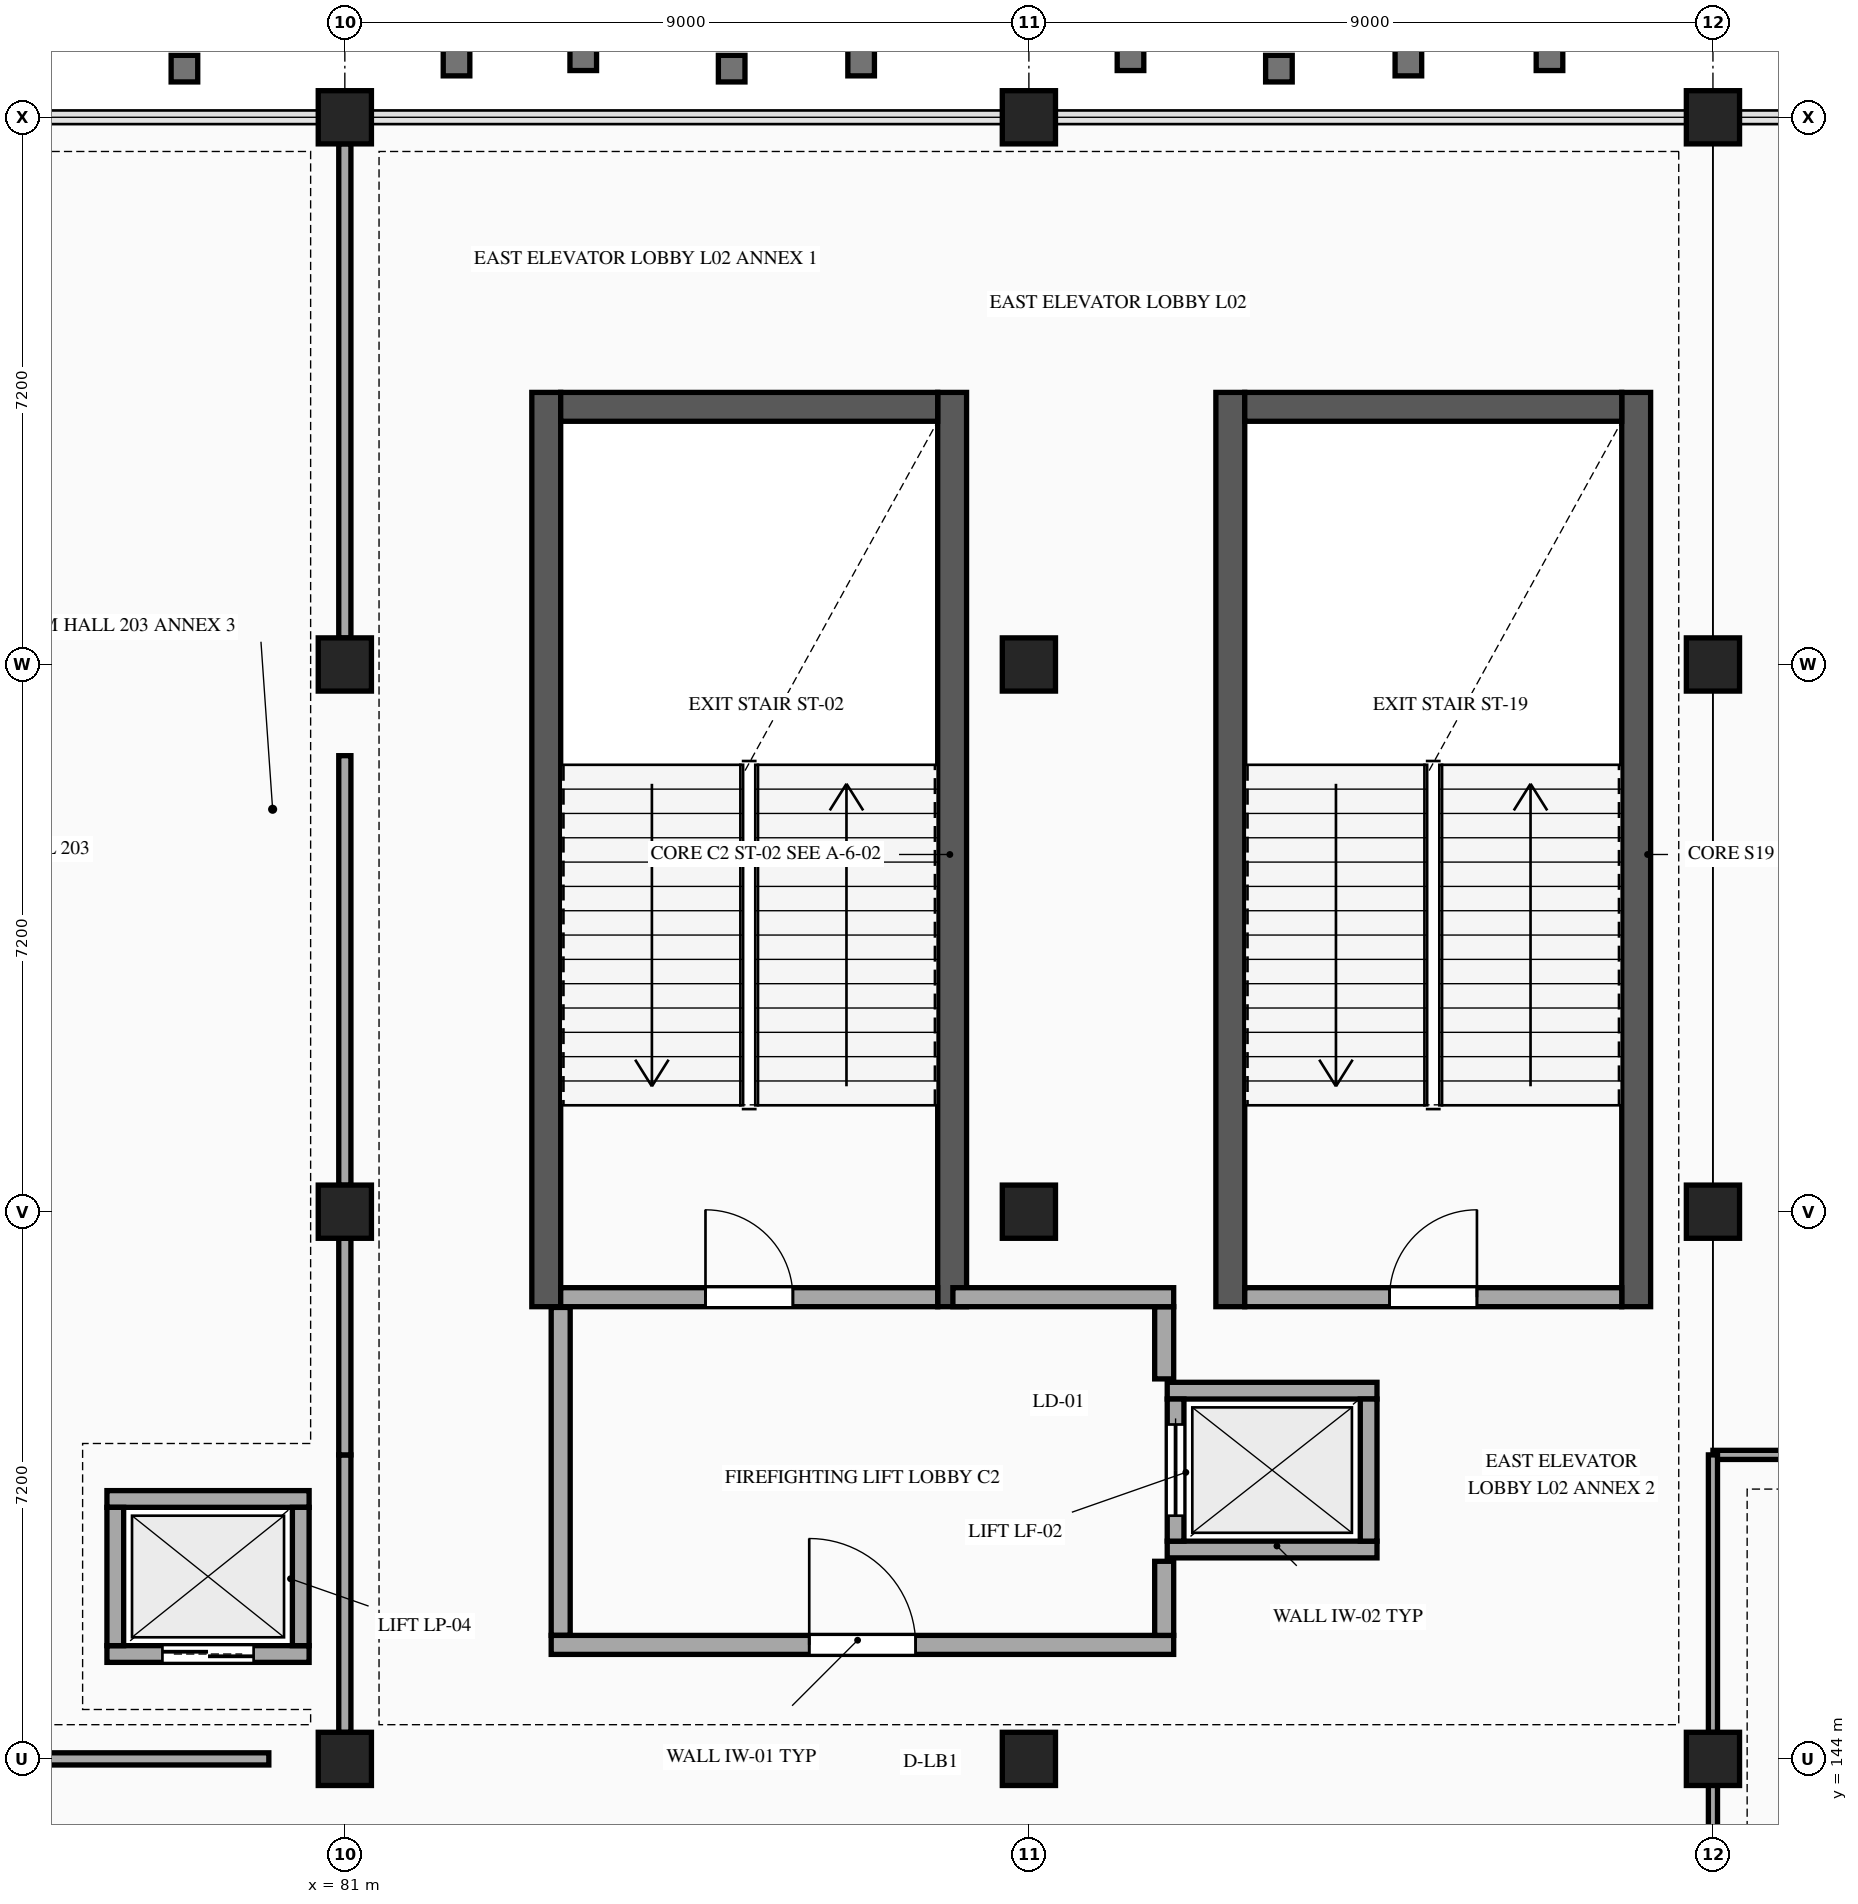
"""IFC4 building model, lengths in metres.
Left out: names, types, materials, properties, quantities, classifications, styles, units other than length and angle.
Written with IfcOpenShell. Run it as: python <this file> out.ifc"""

import sys

from ifc_helpers import new_model, si_unit, direction, frame, frame_2d, origin, origin_2d, place, context, subcontext, project, spatial, rectangle, extrude, element, fill, save


model = new_model("IFC4")
c1 = context("Model", 3, precision=1e-05, world=origin(), true_north=direction((0.0, 1.0)))
c2 = subcontext(c1, "Body", "Model", "MODEL_VIEW")
j1 = project(units=[si_unit("LENGTHUNIT", "METRE"), si_unit("PLANEANGLEUNIT", "RADIAN")], contexts=[c1])
p1 = place(None, origin())
s1 = spatial("IfcSite", under=j1, at=p1, CompositionType="ELEMENT")
p2 = place(p1, origin())
s2 = spatial("IfcBuilding", under=s1, at=p2, CompositionType="ELEMENT")
p3 = place(p2, frame((0.0, 0.0, 10.8)))
s3 = spatial("IfcBuildingStorey", under=s2, at=p3, CompositionType="ELEMENT", Elevation=10.8)
for number, where, z_axis, x_axis in (
    (1, (81.0, 144.0, 0.0), (0.0, 0.0, 1.0), (1.0, 0.0, 0.0)),
    (2, (81.0, 151.2, 0.0), (0.0, 0.0, 1.0), (1.0, 0.0, 0.0)),
    (3, (81.0, 158.4, 0.0), (0.0, 0.0, 1.0), (1.0, 0.0, 0.0)),
    (4, (81.0, 165.6, 0.0), (0.0, 0.0, 1.0), (1.0, 0.0, 0.0)),
    (5, (90.0, 144.0, 0.0), (0.0, 0.0, 1.0), (1.0, 0.0, 0.0)),
    (6, (90.0, 151.2, 0.0), (0.0, 0.0, 1.0), (1.0, 0.0, 0.0)),
    (7, (90.0, 158.4, 0.0), (0.0, 0.0, 1.0), (1.0, 0.0, 0.0)),
    (8, (90.0, 165.6, 0.0), (0.0, 0.0, 1.0), (1.0, 0.0, 0.0)),
    (9, (99.0, 144.0, 0.0), (0.0, 0.0, 1.0), (1.0, 0.0, 0.0)),
    (10, (99.0, 151.2, 0.0), (0.0, 0.0, 1.0), (1.0, 0.0, 0.0)),
    (11, (99.0, 158.4, 0.0), (0.0, 0.0, 1.0), (1.0, 0.0, 0.0)),
    (12, (99.0, 165.6, 0.0), (0.0, 0.0, 1.0), (1.0, 0.0, 0.0)),
):
    element("IfcColumn", number, at=place(p3, frame(where, z_axis=z_axis, x_axis=x_axis)), inside=s3, PredefinedType="COLUMN", context=c2, shape_type="SweptSolid", body=[
        extrude(rectangle(XDim=0.7, YDim=0.7, at=origin_2d()), origin(), (0.0, 0.0, 1.0), 4.5),
    ])
for number, where, z_axis, x_axis in (
    (13, (83.65, 149.95, 0.0), (0.0, 0.0, 1.0), (0.0, 1.0, 0.0)),
    (14, (88.99, 161.98, 0.0), (0.0, 0.0, 1.0), (0.0, -1.0, 0.0)),
):
    element("IfcWall", number, at=place(p3, frame(where, z_axis=z_axis, x_axis=x_axis)), inside=s3, PredefinedType="SHEAR", context=c2, shape_type="SweptSolid", body=[
        extrude(rectangle(XDim=12.03, YDim=0.38, at=frame_2d((6.015, 0.0))), origin(), (0.0, 0.0, 1.0), 4.25),
    ])
p4 = place(p3, frame((83.84, 161.79, 0.0), z_axis=(0.0, 0.0, 1.0), x_axis=(1.0, 0.0, 0.0)))
e15 = element("IfcWall", 15, at=p4, inside=s3, PredefinedType="SHEAR", context=c2, shape_type="SweptSolid", body=[
    extrude(rectangle(XDim=4.96, YDim=0.38, at=frame_2d((2.48, 0.0))), origin(), (0.0, 0.0, 1.0), 4.25),
])
for number, where, z_axis, x_axis in (
    (16, (92.65, 149.95, 0.0), (0.0, 0.0, 1.0), (0.0, 1.0, 0.0)),
    (17, (97.99, 161.98, 0.0), (0.0, 0.0, 1.0), (0.0, -1.0, 0.0)),
):
    element("IfcWall", number, at=place(p3, frame(where, z_axis=z_axis, x_axis=x_axis)), inside=s3, PredefinedType="SHEAR", context=c2, shape_type="SweptSolid", body=[
        extrude(rectangle(XDim=12.03, YDim=0.38, at=frame_2d((6.015, 0.0))), origin(), (0.0, 0.0, 1.0), 4.25),
    ])
p5 = place(p3, frame((92.84, 161.79, 0.0), z_axis=(0.0, 0.0, 1.0), x_axis=(1.0, 0.0, 0.0)))
e18 = element("IfcWall", 18, at=p5, inside=s3, PredefinedType="SHEAR", context=c2, shape_type="SweptSolid", body=[
    extrude(rectangle(XDim=4.96, YDim=0.38, at=frame_2d((2.48, 0.0))), origin(), (0.0, 0.0, 1.0), 4.25),
])
p6 = place(p3, frame((83.84, 150.075, 0.0), z_axis=(0.0, 0.0, 1.0), x_axis=(1.0, 0.0, 0.0)))
e19 = element("IfcWall", 19, at=p6, inside=s3, PredefinedType="STANDARD", context=c2, shape_type="SweptSolid", body=[
    extrude(rectangle(XDim=4.96, YDim=0.25, at=frame_2d((2.48, 0.0))), origin(), (0.0, 0.0, 1.0), 4.22),
])
p7 = place(p6, frame((1.905, 0.0, 0.0)))
e20 = element("IfcOpeningElement", 20, at=p7, cuts=e19, PredefinedType="OPENING", context=c2, shape_type="SweptSolid", body=[
    extrude(rectangle(XDim=1.15, YDim=2.2, at=frame_2d((0.575, 1.1))), frame((0.0, 0.135, 0.0), z_axis=(0.0, -1.0, 0.0), x_axis=(1.0, 0.0, 0.0)), (0.0, 0.0, 1.0), 0.27),
])
for number, where, z_axis, x_axis in (
    (21, (91.82, 146.755, 0.0), (0.0, 0.0, 1.0), (1.0, 0.0, 0.0)),
    (22, (94.58, 148.845, 0.0), (0.0, 0.0, 1.0), (-1.0, 0.0, 0.0)),
):
    element("IfcWall", number, at=place(p3, frame(where, z_axis=z_axis, x_axis=x_axis)), inside=s3, PredefinedType="STANDARD", context=c2, shape_type="SweptSolid", body=[
        extrude(rectangle(XDim=2.76, YDim=0.22, at=frame_2d((1.38, 0.0))), origin(), (0.0, 0.0, 1.0), 4.22),
    ])
p8 = place(p3, frame((91.93, 148.735, 0.0), z_axis=(0.0, 0.0, 1.0), x_axis=(0.0, -1.0, 0.0)))
e23 = element("IfcWall", 23, at=p8, inside=s3, PredefinedType="STANDARD", context=c2, shape_type="SweptSolid", body=[
    extrude(rectangle(XDim=1.87, YDim=0.22, at=frame_2d((0.935, 0.0))), origin(), (0.0, 0.0, 1.0), 4.22),
])
p9 = place(p8, frame((0.335, 0.0, 0.0)))
e24 = element("IfcOpeningElement", 24, at=p9, cuts=e23, PredefinedType="OPENING", context=c2, shape_type="SweptSolid", body=[
    extrude(rectangle(XDim=1.2, YDim=2.2, at=frame_2d((0.6, 1.1))), frame((0.0, 0.12, 0.0), z_axis=(0.0, -1.0, 0.0), x_axis=(1.0, 0.0, 0.0)), (0.0, 0.0, 1.0), 0.24),
])
p10 = place(p3, frame((94.47, 146.865, 0.0), z_axis=(0.0, 0.0, 1.0), x_axis=(0.0, 1.0, 0.0)))
e25 = element("IfcWall", 25, at=p10, inside=s3, PredefinedType="STANDARD", context=c2, shape_type="SweptSolid", body=[
    extrude(rectangle(XDim=1.87, YDim=0.22, at=frame_2d((0.935, 0.0))), origin(), (0.0, 0.0, 1.0), 4.22),
])
p11 = place(p3, frame((77.87, 145.38, 0.0), z_axis=(0.0, 0.0, 1.0), x_axis=(1.0, 0.0, 0.0)))
e26 = element("IfcWall", 26, at=p11, inside=s3, PredefinedType="STANDARD", context=c2, shape_type="SweptSolid", body=[
    extrude(rectangle(XDim=2.66, YDim=0.22, at=frame_2d((1.33, 0.0))), origin(), (0.0, 0.0, 1.0), 4.22),
])
p12 = place(p11, frame((0.73, 0.0, 0.0)))
e27 = element("IfcOpeningElement", 27, at=p12, cuts=e26, PredefinedType="OPENING", context=c2, shape_type="SweptSolid", body=[
    extrude(rectangle(XDim=1.2, YDim=2.2, at=frame_2d((0.6, 1.1))), frame((0.0, 0.12, 0.0), z_axis=(0.0, -1.0, 0.0), x_axis=(1.0, 0.0, 0.0)), (0.0, 0.0, 1.0), 0.24),
])
p13 = place(p3, frame((80.53, 147.42, 0.0), z_axis=(0.0, 0.0, 1.0), x_axis=(-1.0, 0.0, 0.0)))
e28 = element("IfcWall", 28, at=p13, inside=s3, PredefinedType="STANDARD", context=c2, shape_type="SweptSolid", body=[
    extrude(rectangle(XDim=2.66, YDim=0.22, at=frame_2d((1.33, 0.0))), origin(), (0.0, 0.0, 1.0), 4.22),
])
for number, where, z_axis, x_axis in (
    (29, (77.98, 147.31, 0.0), (0.0, 0.0, 1.0), (0.0, -1.0, 0.0)),
    (30, (80.42, 145.49, 0.0), (0.0, 0.0, 1.0), (0.0, 1.0, 0.0)),
):
    element("IfcWall", number, at=place(p3, frame(where, z_axis=z_axis, x_axis=x_axis)), inside=s3, PredefinedType="STANDARD", context=c2, shape_type="SweptSolid", body=[
        extrude(rectangle(XDim=1.82, YDim=0.22, at=frame_2d((0.91, 0.0))), origin(), (0.0, 0.0, 1.0), 4.22),
    ])
p14 = place(p3, frame((92.84, 150.075, 0.0), z_axis=(0.0, 0.0, 1.0), x_axis=(1.0, 0.0, 0.0)))
e31 = element("IfcWall", 31, at=p14, inside=s3, PredefinedType="STANDARD", context=c2, shape_type="SweptSolid", body=[
    extrude(rectangle(XDim=4.96, YDim=0.25, at=frame_2d((2.48, 0.0))), origin(), (0.0, 0.0, 1.0), 4.22),
])
p15 = place(p14, frame((1.905, 0.0, 0.0)))
e32 = element("IfcOpeningElement", 32, at=p15, cuts=e31, PredefinedType="OPENING", context=c2, shape_type="SweptSolid", body=[
    extrude(rectangle(XDim=1.15, YDim=2.2, at=frame_2d((0.575, 1.1))), frame((0.0, 0.135, 0.0), z_axis=(0.0, -1.0, 0.0), x_axis=(1.0, 0.0, 0.0)), (0.0, 0.0, 1.0), 0.27),
])
p16 = place(p3, frame((83.84, 149.94, 0.0), z_axis=(0.0, 0.0, 1.0), x_axis=(0.0, -1.0, 0.0)))
e33 = element("IfcWall", 33, at=p16, inside=s3, PredefinedType="STANDARD", context=c2, shape_type="SweptSolid", body=[
    extrude(rectangle(XDim=4.315, YDim=0.25, at=frame_2d((2.157, 0.0))), origin(), (0.0, 0.0, 1.0), 3.638),
])
p17 = place(p3, frame((83.715, 145.5, 0.0), z_axis=(0.0, 0.0, 1.0), x_axis=(1.0, 0.0, 0.0)))
e34 = element("IfcWall", 34, at=p17, inside=s3, PredefinedType="STANDARD", context=c2, shape_type="SweptSolid", body=[
    extrude(rectangle(XDim=8.19, YDim=0.25, at=frame_2d((4.095, 0.0))), origin(), (0.0, 0.0, 1.0), 3.638),
])
p18 = place(p17, frame((3.395, 0.0, 0.0)))
e35 = element("IfcOpeningElement", 35, at=p18, cuts=e34, PredefinedType="OPENING", context=c2, shape_type="SweptSolid", body=[
    extrude(rectangle(XDim=1.4, YDim=2.2, at=frame_2d((0.7, 1.1))), frame((0.0, 0.135, 0.0), z_axis=(0.0, -1.0, 0.0), x_axis=(1.0, 0.0, 0.0)), (0.0, 0.0, 1.0), 0.27),
])
p19 = place(p3, frame((91.78, 145.625, 0.0), z_axis=(0.0, 0.0, 1.0), x_axis=(0.0, 1.0, 0.0)))
e36 = element("IfcWall", 36, at=p19, inside=s3, PredefinedType="STANDARD", context=c2, shape_type="SweptSolid", body=[
    extrude(rectangle(XDim=0.975, YDim=0.25, at=frame_2d((0.488, 0.0))), origin(), (0.0, 0.0, 1.0), 3.638),
])
p20 = place(p3, frame((91.78, 149.0, 0.0), z_axis=(0.0, 0.0, 1.0), x_axis=(0.0, 1.0, 0.0)))
e37 = element("IfcWall", 37, at=p20, inside=s3, PredefinedType="STANDARD", context=c2, shape_type="SweptSolid", body=[
    extrude(rectangle(XDim=0.95, YDim=0.25, at=frame_2d((0.475, 0.0))), origin(), (0.0, 0.0, 1.0), 3.638),
])
p21 = place(p3, frame((89.0, 150.075, 0.0), z_axis=(0.0, 0.0, 1.0), x_axis=(1.0, 0.0, 0.0)))
e38 = element("IfcWall", 38, at=p21, inside=s3, PredefinedType="STANDARD", context=c2, shape_type="SweptSolid", body=[
    extrude(rectangle(XDim=2.905, YDim=0.25, at=frame_2d((1.453, 0.0))), origin(), (0.0, 0.0, 1.0), 3.638),
])
p22 = place(p3, frame((76.5, 144.0, 0.0), z_axis=(0.0, 0.0, 1.0), x_axis=(1.0, 0.0, 0.0)))
e39 = element("IfcWall", 39, at=p22, inside=s3, PredefinedType="PARTITIONING", context=c2, shape_type="SweptSolid", body=[
    extrude(rectangle(XDim=3.5, YDim=0.16, at=frame_2d((1.75, 0.0))), origin(), (0.0, 0.0, 1.0), 3.628),
])
p23 = place(p3, frame((99.0, 148.0, 0.0), z_axis=(0.0, 0.0, 1.0), x_axis=(1.0, 0.0, 0.0)))
e40 = element("IfcWall", 40, at=p23, inside=s3, PredefinedType="PARTITIONING", context=c2, shape_type="SweptSolid", body=[
    extrude(rectangle(XDim=9.0, YDim=0.12, at=frame_2d((4.5, 0.0))), origin(), (0.0, 0.0, 1.0), 3.638),
])
p24 = place(p3, frame((81.0, 144.348, 0.0), z_axis=(0.0, 0.0, 1.0), x_axis=(0.0, 1.0, 0.0)))
e41 = element("IfcWall", 41, at=p24, inside=s3, PredefinedType="PARTITIONING", context=c2, shape_type="SweptSolid", body=[
    extrude(rectangle(XDim=3.652, YDim=0.16, at=frame_2d((1.826, 0.0))), origin(), (0.0, 0.0, 1.0), 3.628),
])
p25 = place(p3, frame((81.0, 148.0, 0.0), z_axis=(0.0, 0.0, 1.0), x_axis=(0.0, 1.0, 0.0)))
e42 = element("IfcWall", 42, at=p25, inside=s3, PredefinedType="PARTITIONING", context=c2, shape_type="SweptSolid", body=[
    extrude(rectangle(XDim=2.852, YDim=0.16, at=frame_2d((1.426, 0.0))), origin(), (0.0, 0.0, 1.0), 3.628),
])
p26 = place(p3, frame((81.0, 151.548, 0.0), z_axis=(0.0, 0.0, 1.0), x_axis=(0.0, 1.0, 0.0)))
e43 = element("IfcWall", 43, at=p26, inside=s3, PredefinedType="PARTITIONING", context=c2, shape_type="SweptSolid", body=[
    extrude(rectangle(XDim=5.652, YDim=0.16, at=frame_2d((2.826, 0.0))), origin(), (0.0, 0.0, 1.0), 3.628),
])
p27 = place(p3, frame((81.0, 158.748, 0.0), z_axis=(0.0, 0.0, 1.0), x_axis=(0.0, 1.0, 0.0)))
e44 = element("IfcWall", 44, at=p27, inside=s3, PredefinedType="PARTITIONING", context=c2, shape_type="SweptSolid", body=[
    extrude(rectangle(XDim=6.504, YDim=0.16, at=frame_2d((3.252, 0.0))), origin(), (0.0, 0.0, 1.0), 3.628),
])
p28 = place(p3, frame((99.0, 137.148, 0.0), z_axis=(0.0, 0.0, 1.0), x_axis=(0.0, 1.0, 0.0)))
e45 = element("IfcWall", 45, at=p28, inside=s3, PredefinedType="PARTITIONING", context=c2, shape_type="SweptSolid", body=[
    extrude(rectangle(XDim=6.504, YDim=0.12, at=frame_2d((3.252, 0.0))), origin(), (0.0, 0.0, 1.0), 3.628),
])
p29 = place(p3, frame((99.0, 144.348, 0.0), z_axis=(0.0, 0.0, 1.0), x_axis=(0.0, 1.0, 0.0)))
e46 = element("IfcWall", 46, at=p29, inside=s3, PredefinedType="PARTITIONING", context=c2, shape_type="SweptSolid", body=[
    extrude(rectangle(XDim=3.652, YDim=0.12, at=frame_2d((1.826, 0.0))), origin(), (0.0, 0.0, 1.0), 3.628),
])
p30 = place(p7, origin())
e47 = element("IfcDoor", 47, at=p30, inside=s3, OperationType="SINGLE_SWING_LEFT", PredefinedType="DOOR", context=c2, shape_type="SweptSolid", body=[
    extrude(rectangle(XDim=1.15, YDim=2.2, at=frame_2d((0.575, 1.1))), frame((0.0, 0.025, 0.0), z_axis=(0.0, -1.0, 0.0), x_axis=(1.0, 0.0, 0.0)), (0.0, 0.0, 1.0), 0.05),
])
fill(e20, e47)
p31 = place(p9, origin())
e48 = element("IfcDoor", 48, at=p31, inside=s3, OperationType="DOUBLE_DOOR_SLIDING", PredefinedType="DOOR", context=c2, shape_type="SweptSolid", body=[
    extrude(rectangle(XDim=1.2, YDim=2.2, at=frame_2d((0.6, 1.1))), frame((0.0, 0.025, 0.0), z_axis=(0.0, -1.0, 0.0), x_axis=(1.0, 0.0, 0.0)), (0.0, 0.0, 1.0), 0.05),
])
fill(e24, e48)
p32 = place(p12, origin())
e49 = element("IfcDoor", 49, at=p32, inside=s3, OperationType="DOUBLE_DOOR_SLIDING", PredefinedType="DOOR", context=c2, shape_type="SweptSolid", body=[
    extrude(rectangle(XDim=1.2, YDim=2.2, at=frame_2d((0.6, 1.1))), frame((0.0, 0.025, 0.0), z_axis=(0.0, -1.0, 0.0), x_axis=(1.0, 0.0, 0.0)), (0.0, 0.0, 1.0), 0.05),
])
fill(e27, e49)
p33 = place(p15, origin())
e50 = element("IfcDoor", 50, at=p33, inside=s3, OperationType="SINGLE_SWING_RIGHT", PredefinedType="DOOR", context=c2, shape_type="SweptSolid", body=[
    extrude(rectangle(XDim=1.15, YDim=2.2, at=frame_2d((0.575, 1.1))), frame((0.0, 0.025, 0.0), z_axis=(0.0, -1.0, 0.0), x_axis=(1.0, 0.0, 0.0)), (0.0, 0.0, 1.0), 0.05),
])
fill(e32, e50)
p34 = place(p18, origin())
e51 = element("IfcDoor", 51, at=p34, inside=s3, OperationType="SINGLE_SWING_LEFT", PredefinedType="DOOR", context=c2, shape_type="SweptSolid", body=[
    extrude(rectangle(XDim=1.4, YDim=2.2, at=frame_2d((0.7, 1.1))), frame((0.0, 0.025, 0.0), z_axis=(0.0, -1.0, 0.0), x_axis=(1.0, 0.0, 0.0)), (0.0, 0.0, 1.0), 0.05),
])
fill(e35, e51)
save(model, sys.argv[1])
